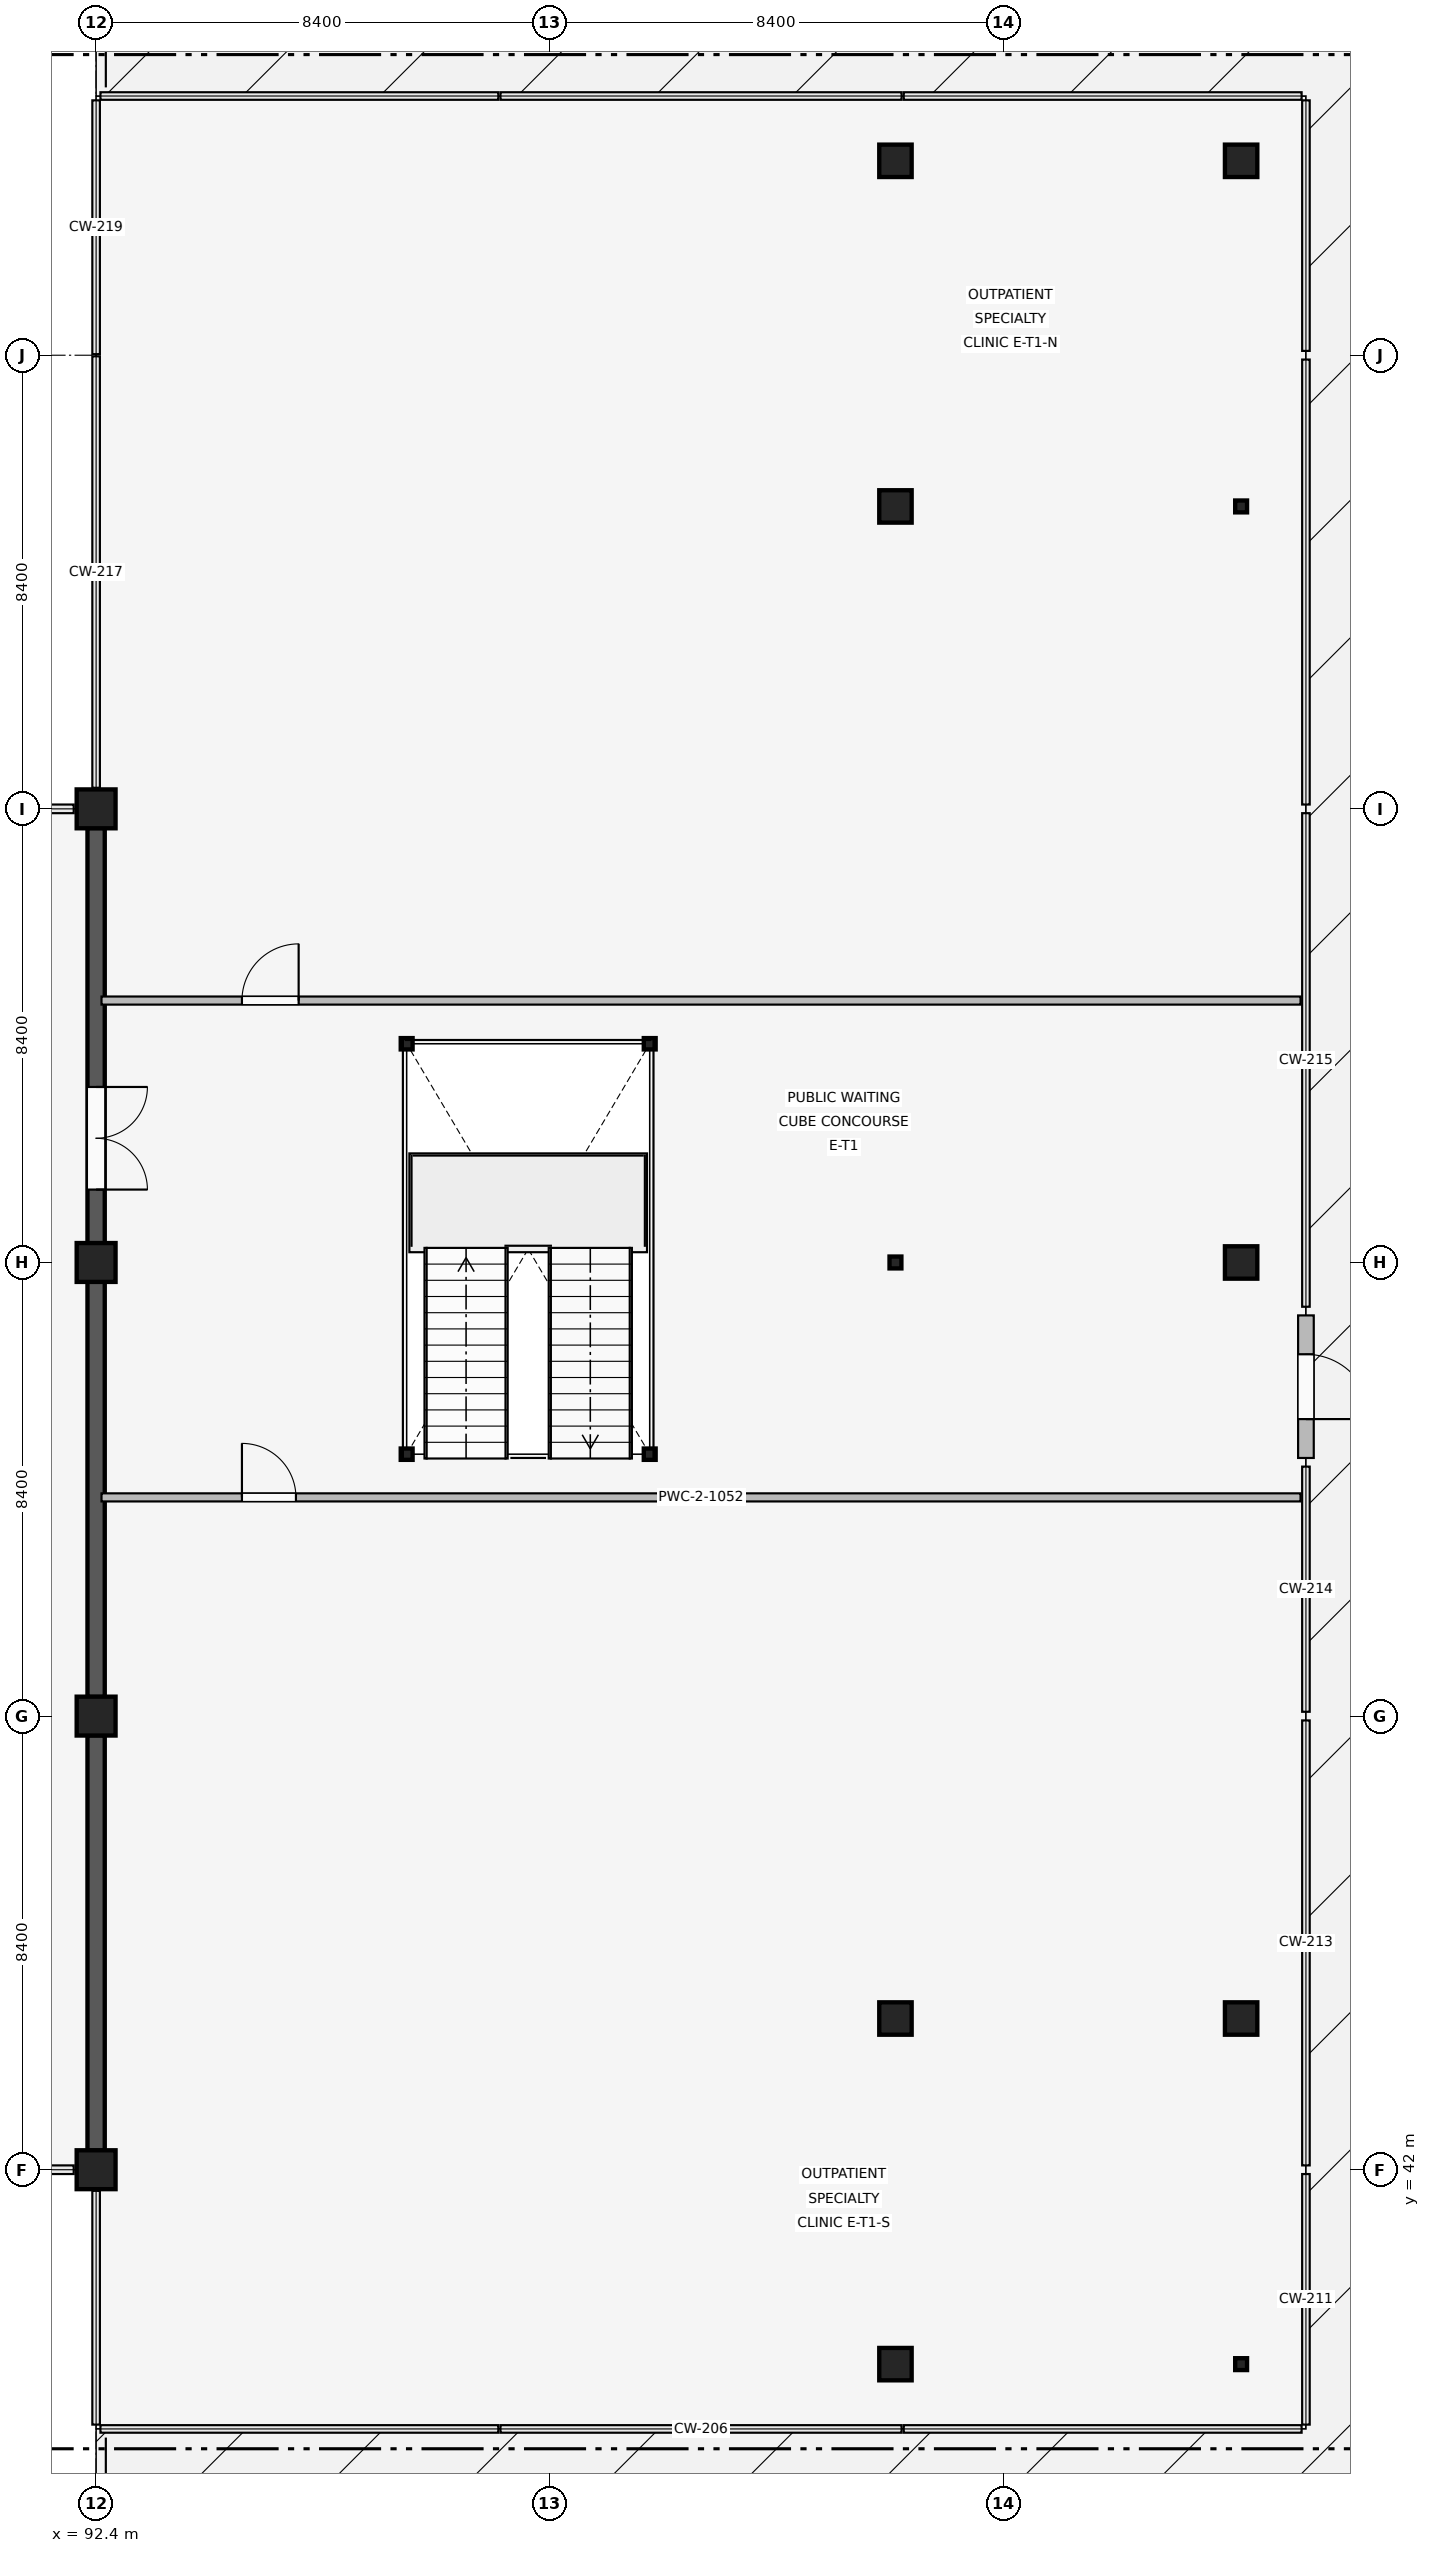
"""IFC4 building model, lengths in metres.
Left out: names, types, materials, properties, quantities, classifications, styles, units other than length and angle.
Written with IfcOpenShell. Run it as: python <this file> out.ifc"""

import sys

from ifc_helpers import new_model, si_unit, direction, frame, frame_2d, origin, origin_2d, place, context, subcontext, project, spatial, rectangle, i_section, extrude, element, fill, save


model = new_model("IFC4")
c1 = context("Model", 3, precision=1e-05, world=origin(), true_north=direction((0.0, 1.0)))
c2 = subcontext(c1, "Body", "Model", "MODEL_VIEW")
j1 = project(units=[si_unit("LENGTHUNIT", "METRE"), si_unit("PLANEANGLEUNIT", "RADIAN")], contexts=[c1])
p1 = place(None, origin())
s1 = spatial("IfcSite", under=j1, at=p1, CompositionType="ELEMENT")
p2 = place(p1, origin())
s2 = spatial("IfcBuilding", under=s1, at=p2, CompositionType="ELEMENT")
p3 = place(p2, frame((0.0, 0.0, 8.1)))
s3 = spatial("IfcBuildingStorey", under=s2, at=p3, CompositionType="ELEMENT", Elevation=8.1)
for number, where, z_axis, x_axis in (
    (1, (92.4, 42.0, 0.0), (0.0, 0.0, 1.0), (1.0, 0.0, 0.0)),
    (2, (92.4, 50.4, 0.0), (0.0, 0.0, 1.0), (1.0, 0.0, 0.0)),
    (3, (92.4, 58.8, 0.0), (0.0, 0.0, 1.0), (1.0, 0.0, 0.0)),
    (4, (92.4, 67.2, 0.0), (0.0, 0.0, 1.0), (1.0, 0.0, 0.0)),
):
    element("IfcColumn", number, at=place(p3, frame(where, z_axis=z_axis, x_axis=x_axis)), inside=s3, PredefinedType="COLUMN", context=c2, shape_type="SweptSolid", body=[
        extrude(rectangle(XDim=0.72, YDim=0.72, at=origin_2d()), origin(), (0.0, 0.0, 1.0), 4.8),
    ])
for number, where, z_axis, x_axis in (
    (5, (107.2, 38.4, 0.0), (0.0, 0.0, 1.0), (1.0, 0.0, 0.0)),
    (6, (107.2, 44.8, 0.0), (0.0, 0.0, 1.0), (1.0, 0.0, 0.0)),
):
    element("IfcColumn", number, at=place(p3, frame(where, z_axis=z_axis, x_axis=x_axis)), inside=s3, PredefinedType="COLUMN", context=c2, shape_type="SweptSolid", body=[
        extrude(rectangle(XDim=0.6, YDim=0.6, at=origin_2d()), origin(), (0.0, 0.0, 1.0), 4.8),
    ])
p4 = place(p3, frame((107.2, 58.8, 0.0), z_axis=(0.0, 0.0, 1.0), x_axis=(1.0, 0.0, 0.0)))
e7 = element("IfcColumn", 7, at=p4, inside=s3, PredefinedType="COLUMN", context=c2, shape_type="SweptSolid", body=[
    extrude(i_section(OverallWidth=0.22, OverallDepth=0.22, WebThickness=0.01, FlangeThickness=0.016, at=origin_2d()), origin(), (0.0, 0.0, 1.0), 4.8),
])
for number, where, z_axis, x_axis in (
    (8, (107.2, 72.8, 0.0), (0.0, 0.0, 1.0), (1.0, 0.0, 0.0)),
    (9, (107.2, 79.2, 0.0), (0.0, 0.0, 1.0), (1.0, 0.0, 0.0)),
):
    element("IfcColumn", number, at=place(p3, frame(where, z_axis=z_axis, x_axis=x_axis)), inside=s3, PredefinedType="COLUMN", context=c2, shape_type="SweptSolid", body=[
        extrude(rectangle(XDim=0.6, YDim=0.6, at=origin_2d()), origin(), (0.0, 0.0, 1.0), 4.8),
    ])
p5 = place(p3, frame((113.6, 38.4, 0.0), z_axis=(0.0, 0.0, 1.0), x_axis=(1.0, 0.0, 0.0)))
e10 = element("IfcColumn", 10, at=p5, inside=s3, PredefinedType="COLUMN", context=c2, shape_type="SweptSolid", body=[
    extrude(i_section(OverallWidth=0.22, OverallDepth=0.22, WebThickness=0.01, FlangeThickness=0.016, at=origin_2d()), origin(), (0.0, 0.0, 1.0), 4.8),
])
for number, where, z_axis, x_axis in (
    (11, (113.6, 44.8, 0.0), (0.0, 0.0, 1.0), (1.0, 0.0, 0.0)),
    (12, (113.6, 58.8, 0.0), (0.0, 0.0, 1.0), (1.0, 0.0, 0.0)),
):
    element("IfcColumn", number, at=place(p3, frame(where, z_axis=z_axis, x_axis=x_axis)), inside=s3, PredefinedType="COLUMN", context=c2, shape_type="SweptSolid", body=[
        extrude(rectangle(XDim=0.6, YDim=0.6, at=origin_2d()), origin(), (0.0, 0.0, 1.0), 4.8),
    ])
p6 = place(p3, frame((113.6, 72.8, 0.0), z_axis=(0.0, 0.0, 1.0), x_axis=(1.0, 0.0, 0.0)))
e13 = element("IfcColumn", 13, at=p6, inside=s3, PredefinedType="COLUMN", context=c2, shape_type="SweptSolid", body=[
    extrude(i_section(OverallWidth=0.22, OverallDepth=0.22, WebThickness=0.01, FlangeThickness=0.016, at=origin_2d()), origin(), (0.0, 0.0, 1.0), 4.8),
])
p7 = place(p3, frame((113.6, 79.2, 0.0), z_axis=(0.0, 0.0, 1.0), x_axis=(1.0, 0.0, 0.0)))
e14 = element("IfcColumn", 14, at=p7, inside=s3, PredefinedType="COLUMN", context=c2, shape_type="SweptSolid", body=[
    extrude(rectangle(XDim=0.6, YDim=0.6, at=origin_2d()), origin(), (0.0, 0.0, 1.0), 4.8),
])
for number, where, z_axis, x_axis in (
    (15, (98.15, 55.25, 0.0), (0.0, 0.0, 1.0), (1.0, 0.0, 0.0)),
    (16, (102.65, 55.25, 0.0), (0.0, 0.0, 1.0), (1.0, 0.0, 0.0)),
    (17, (98.15, 62.85, 0.0), (0.0, 0.0, 1.0), (1.0, 0.0, 0.0)),
    (18, (102.65, 62.85, 0.0), (0.0, 0.0, 1.0), (1.0, 0.0, 0.0)),
):
    element("IfcColumn", number, at=place(p3, frame(where, z_axis=z_axis, x_axis=x_axis)), inside=s3, PredefinedType="COLUMN", context=c2, shape_type="SweptSolid", body=[
        extrude(i_section(OverallWidth=0.22, OverallDepth=0.21, WebThickness=0.007, FlangeThickness=0.011, at=origin_2d()), origin(), (0.0, 0.0, 1.0), 4.8),
    ])
p8 = place(p3, frame((92.4, 50.045, 0.0), z_axis=(0.0, 0.0, 1.0), x_axis=(0.0, -1.0, 0.0)))
e19 = element("IfcWall", 19, at=p8, inside=s3, PredefinedType="SOLIDWALL", context=c2, shape_type="SweptSolid", body=[
    extrude(rectangle(XDim=7.69, YDim=0.32, at=frame_2d((3.845, 0.0))), origin(), (0.0, 0.0, 1.0), 3.86),
])
p9 = place(p3, frame((92.4, 58.445, 0.0), z_axis=(0.0, 0.0, 1.0), x_axis=(0.0, -1.0, 0.0)))
e20 = element("IfcWall", 20, at=p9, inside=s3, PredefinedType="SOLIDWALL", context=c2, shape_type="SweptSolid", body=[
    extrude(rectangle(XDim=7.69, YDim=0.32, at=frame_2d((3.845, 0.0))), origin(), (0.0, 0.0, 1.0), 3.86),
])
p10 = place(p3, frame((92.4, 66.845, 0.0), z_axis=(0.0, 0.0, 1.0), x_axis=(0.0, -1.0, 0.0)))
e21 = element("IfcWall", 21, at=p10, inside=s3, PredefinedType="SOLIDWALL", context=c2, shape_type="SweptSolid", body=[
    extrude(rectangle(XDim=7.69, YDim=0.32, at=frame_2d((3.845, 0.0))), origin(), (0.0, 0.0, 1.0), 3.86),
])
p11 = place(p10, frame((4.795, 0.0, 0.0)))
e22 = element("IfcOpeningElement", 22, at=p11, cuts=e21, PredefinedType="OPENING", context=c2, shape_type="SweptSolid", body=[
    extrude(rectangle(XDim=1.9, YDim=2.4, at=frame_2d((0.95, 1.2))), frame((0.0, 0.17, 0.0), z_axis=(0.0, -1.0, 0.0), x_axis=(1.0, 0.0, 0.0)), (0.0, 0.0, 1.0), 0.34),
])
p12 = place(p3, frame((114.8, 57.82, 0.0), z_axis=(0.0, 0.0, 1.0), x_axis=(0.0, -1.0, 0.0)))
e23 = element("IfcWall", 23, at=p12, inside=s3, PredefinedType="SOLIDWALL", context=c2, shape_type="SweptSolid", body=[
    extrude(rectangle(XDim=2.64, YDim=0.29, at=frame_2d((1.32, 0.0))), origin(), (0.0, 0.0, 1.0), 4.56),
])
p13 = place(p12, frame((0.72, 0.0, 0.0)))
e24 = element("IfcOpeningElement", 24, at=p13, cuts=e23, PredefinedType="OPENING", context=c2, shape_type="SweptSolid", body=[
    extrude(rectangle(XDim=1.2, YDim=2.25, at=frame_2d((0.6, 1.125))), frame((0.0, 0.155, 0.0), z_axis=(0.0, -1.0, 0.0), x_axis=(1.0, 0.0, 0.0)), (0.0, 0.0, 1.0), 0.31),
])
p14 = place(p3, frame((92.5, 54.45, 0.0), z_axis=(0.0, 0.0, 1.0), x_axis=(1.0, 0.0, 0.0)))
e25 = element("IfcWall", 25, at=p14, inside=s3, PredefinedType="PARTITIONING", context=c2, shape_type="SweptSolid", body=[
    extrude(rectangle(XDim=22.2, YDim=0.15, at=frame_2d((11.1, 0.0))), origin(), (0.0, 0.0, 1.0), 4.09),
])
p15 = place(p14, frame((2.6, 0.0, 0.0)))
e26 = element("IfcOpeningElement", 26, at=p15, cuts=e25, PredefinedType="OPENING", context=c2, shape_type="SweptSolid", body=[
    extrude(rectangle(XDim=1.0, YDim=2.15, at=frame_2d((0.5, 1.075))), frame((0.0, 0.085, 0.0), z_axis=(0.0, -1.0, 0.0), x_axis=(1.0, 0.0, 0.0)), (0.0, 0.0, 1.0), 0.17),
])
p16 = place(p3, frame((92.5, 63.65, 0.0), z_axis=(0.0, 0.0, 1.0), x_axis=(1.0, 0.0, 0.0)))
e27 = element("IfcWall", 27, at=p16, inside=s3, PredefinedType="PARTITIONING", context=c2, shape_type="SweptSolid", body=[
    extrude(rectangle(XDim=22.2, YDim=0.15, at=frame_2d((11.1, 0.0))), origin(), (0.0, 0.0, 1.0), 4.09),
])
p17 = place(p16, frame((2.6, 0.0, 0.0)))
e28 = element("IfcOpeningElement", 28, at=p17, cuts=e27, PredefinedType="OPENING", context=c2, shape_type="SweptSolid", body=[
    extrude(rectangle(XDim=1.05, YDim=2.2, at=frame_2d((0.525, 1.1))), frame((0.0, 0.085, 0.0), z_axis=(0.0, -1.0, 0.0), x_axis=(1.0, 0.0, 0.0)), (0.0, 0.0, 1.0), 0.17),
])
p18 = place(p11, origin())
e29 = element("IfcDoor", 29, at=p18, inside=s3, OperationType="DOUBLE_SWING_LEFT", PredefinedType="DOOR", context=c2, shape_type="SweptSolid", body=[
    extrude(rectangle(XDim=1.9, YDim=2.4, at=frame_2d((0.95, 1.2))), frame((0.0, 0.025, 0.0), z_axis=(0.0, -1.0, 0.0), x_axis=(1.0, 0.0, 0.0)), (0.0, 0.0, 1.0), 0.05),
])
fill(e22, e29)
p19 = place(p13, origin())
e30 = element("IfcDoor", 30, at=p19, inside=s3, OperationType="SINGLE_SWING_RIGHT", PredefinedType="DOOR", context=c2, shape_type="SweptSolid", body=[
    extrude(rectangle(XDim=1.2, YDim=2.25, at=frame_2d((0.6, 1.125))), frame((0.0, 0.025, 0.0), z_axis=(0.0, -1.0, 0.0), x_axis=(1.0, 0.0, 0.0)), (0.0, 0.0, 1.0), 0.05),
])
fill(e24, e30)
p20 = place(p15, origin())
e31 = element("IfcDoor", 31, at=p20, inside=s3, OperationType="SINGLE_SWING_LEFT", PredefinedType="DOOR", context=c2, shape_type="SweptSolid", body=[
    extrude(rectangle(XDim=1.0, YDim=2.15, at=frame_2d((0.5, 1.075))), frame((0.0, 0.025, 0.0), z_axis=(0.0, -1.0, 0.0), x_axis=(1.0, 0.0, 0.0)), (0.0, 0.0, 1.0), 0.05),
])
fill(e26, e31)
p21 = place(p17, origin())
e32 = element("IfcDoor", 32, at=p21, inside=s3, OperationType="SINGLE_SWING_RIGHT", PredefinedType="DOOR", context=c2, shape_type="SweptSolid", body=[
    extrude(rectangle(XDim=1.05, YDim=2.2, at=frame_2d((0.525, 1.1))), frame((0.0, 0.025, 0.0), z_axis=(0.0, -1.0, 0.0), x_axis=(1.0, 0.0, 0.0)), (0.0, 0.0, 1.0), 0.05),
])
fill(e28, e32)
save(model, sys.argv[1])
